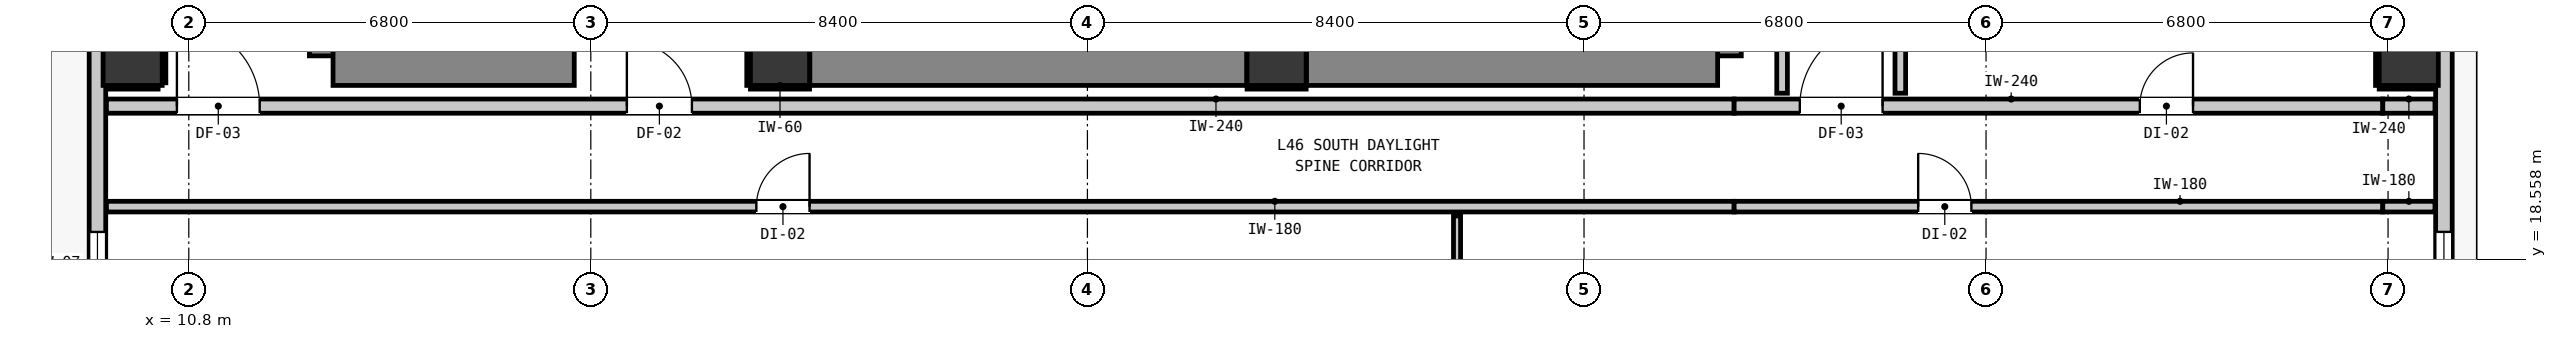
"""IFC4 building model, lengths in metres.
Left out: names, types, materials, properties, quantities, classifications, styles, units other than length and angle.
Written with IfcOpenShell. Run it as: python <this file> out.ifc"""

import sys

from ifc_helpers import new_model, si_unit, direction, frame, frame_2d, origin, origin_2d, place, context, subcontext, project, spatial, rectangle, extrude, element, fill, save


model = new_model("IFC4")
c1 = context("Model", 3, precision=1e-05, world=origin(), true_north=direction((0.0, 1.0)))
c2 = subcontext(c1, "Body", "Model", "MODEL_VIEW")
j1 = project(units=[si_unit("LENGTHUNIT", "METRE"), si_unit("PLANEANGLEUNIT", "RADIAN")], contexts=[c1])
p1 = place(None, origin())
s1 = spatial("IfcSite", under=j1, at=p1, CompositionType="ELEMENT")
p2 = place(p1, origin())
s2 = spatial("IfcBuilding", under=s1, at=p2, CompositionType="ELEMENT")
p3 = place(p2, frame((0.0, 0.0, 159.2)))
s3 = spatial("IfcBuildingStorey", under=s2, at=p3, CompositionType="ELEMENT", Elevation=159.2)
for number, where, z_axis, x_axis in (
    (1, (20.8, 22.0, 0.0), (0.0, 0.0, 1.0), (1.0, 0.0, 0.0)),
    (2, (29.2, 22.0, 0.0), (0.0, 0.0, 1.0), (1.0, 0.0, 0.0)),
):
    element("IfcColumn", number, at=place(p3, frame(where, z_axis=z_axis, x_axis=x_axis)), inside=s3, PredefinedType="COLUMN", context=c2, shape_type="SweptSolid", body=[
        extrude(rectangle(XDim=1.0, YDim=1.0, at=origin_2d()), origin(), (0.0, 0.0, 1.0), 3.32),
    ])
p4 = place(p3, frame((13.34, 22.0, 0.0), z_axis=(0.0, 0.0, 1.0), x_axis=(0.0, 1.0, 0.0)))
e3 = element("IfcWall", 3, at=p4, inside=s3, PredefinedType="SHEAR", context=c2, shape_type="SweptSolid", body=[
    extrude(rectangle(XDim=8.195, YDim=1.0, at=frame_2d((4.098, 0.0))), origin(), (0.0, 0.0, 1.0), 3.32),
])
p5 = place(p3, frame((13.24, 22.0, 0.0), z_axis=(0.0, 0.0, 1.0), x_axis=(1.0, 0.0, 0.0)))
e4 = element("IfcWall", 4, at=p5, inside=s3, PredefinedType="SHEAR", context=c2, shape_type="SweptSolid", body=[
    extrude(rectangle(XDim=4.08, YDim=1.0, at=frame_2d((2.04, 0.0))), origin(), (0.0, 0.0, 1.0), 3.32),
])
p6 = place(p3, frame((36.56, 22.0, 0.0), z_axis=(0.0, 0.0, 1.0), x_axis=(0.0, 1.0, 0.0)))
e5 = element("IfcWall", 5, at=p6, inside=s3, PredefinedType="SHEAR", context=c2, shape_type="SweptSolid", body=[
    extrude(rectangle(XDim=8.195, YDim=1.0, at=frame_2d((4.098, 0.0))), origin(), (0.0, 0.0, 1.0), 3.32),
])
p7 = place(p3, frame((29.705, 22.0, 0.0), z_axis=(0.0, 0.0, 1.0), x_axis=(1.0, 0.0, 0.0)))
e6 = element("IfcWall", 6, at=p7, inside=s3, PredefinedType="SHEAR", context=c2, shape_type="SweptSolid", body=[
    extrude(rectangle(XDim=6.955, YDim=1.0, at=frame_2d((3.478, 0.0))), origin(), (0.0, 0.0, 1.0), 3.32),
])
p8 = place(p3, frame((21.305, 22.0, 0.0), z_axis=(0.0, 0.0, 1.0), x_axis=(1.0, 0.0, 0.0)))
e7 = element("IfcWall", 7, at=p8, inside=s3, PredefinedType="SHEAR", context=c2, shape_type="SweptSolid", body=[
    extrude(rectangle(XDim=7.39, YDim=1.0, at=frame_2d((3.695, 0.0))), origin(), (0.0, 0.0, 1.0), 3.32),
])
for number, where, z_axis, x_axis in (
    (8, (9.85, 22.0, 0.0), (0.0, 0.0, 1.0), (1.0, 0.0, 0.0)),
    (9, (48.35, 22.0, 0.0), (0.0, 0.0, 1.0), (1.0, 0.0, 0.0)),
):
    element("IfcColumn", number, at=place(p3, frame(where, z_axis=z_axis, x_axis=x_axis)), inside=s3, PredefinedType="COLUMN", context=c2, shape_type="SweptSolid", body=[
        extrude(rectangle(XDim=1.0, YDim=1.0, at=origin_2d()), origin(), (0.0, 0.0, 1.0), 3.32),
    ])
p9 = place(p3, frame((9.255, 17.555, 0.0), z_axis=(0.0, 0.0, 1.0), x_axis=(0.0, 1.0, 0.0)))
e10 = element("IfcWall", 10, at=p9, inside=s3, PredefinedType="STANDARD", context=c2, shape_type="SweptSolid", body=[
    extrude(rectangle(XDim=32.29, YDim=0.28, at=frame_2d((16.145, 0.0))), origin(), (0.0, 0.0, 1.0), 3.08),
])
p10 = place(p9, frame((5.467, 0.0, 0.0)))
e11 = element("IfcOpeningElement", 11, at=p10, cuts=e10, PredefinedType="OPENING", context=c2, shape_type="SweptSolid", body=[
    extrude(rectangle(XDim=1.0, YDim=2.15, at=frame_2d((0.5, 1.075))), frame((0.0, 0.15, 0.0), z_axis=(0.0, -1.0, 0.0), x_axis=(1.0, 0.0, 0.0)), (0.0, 0.0, 1.0), 0.3),
])
p11 = place(p9, frame((0.417, 0.0, 0.85)))
e12 = element("IfcOpeningElement", 12, at=p11, cuts=e10, PredefinedType="OPENING", context=c2, shape_type="SweptSolid", body=[
    extrude(rectangle(XDim=1.05, YDim=1.65, at=frame_2d((0.525, 0.825))), frame((0.0, 0.15, 0.0), z_axis=(0.0, -1.0, 0.0), x_axis=(1.0, 0.0, 0.0)), (0.0, 0.0, 1.0), 0.3),
])
p12 = place(p9, frame((30.753, 0.0, 0.85)))
e13 = element("IfcOpeningElement", 13, at=p12, cuts=e10, PredefinedType="OPENING", context=c2, shape_type="SweptSolid", body=[
    extrude(rectangle(XDim=1.05, YDim=1.65, at=frame_2d((0.525, 0.825))), frame((0.0, 0.15, 0.0), z_axis=(0.0, -1.0, 0.0), x_axis=(1.0, 0.0, 0.0)), (0.0, 0.0, 1.0), 0.3),
])
p13 = place(p3, frame((48.945, 49.845, 0.0), z_axis=(0.0, 0.0, 1.0), x_axis=(0.0, -1.0, 0.0)))
e14 = element("IfcWall", 14, at=p13, inside=s3, PredefinedType="STANDARD", context=c2, shape_type="SweptSolid", body=[
    extrude(rectangle(XDim=32.29, YDim=0.28, at=frame_2d((16.145, 0.0))), origin(), (0.0, 0.0, 1.0), 3.08),
])
p14 = place(p13, frame((2.659, 0.0, 0.0)))
e15 = element("IfcOpeningElement", 15, at=p14, cuts=e14, PredefinedType="OPENING", context=c2, shape_type="SweptSolid", body=[
    extrude(rectangle(XDim=1.0, YDim=2.15, at=frame_2d((0.5, 1.075))), frame((0.0, 0.15, 0.0), z_axis=(0.0, -1.0, 0.0), x_axis=(1.0, 0.0, 0.0)), (0.0, 0.0, 1.0), 0.3),
])
p15 = place(p13, frame((30.822, 0.0, 0.85)))
e16 = element("IfcOpeningElement", 16, at=p15, cuts=e14, PredefinedType="OPENING", context=c2, shape_type="SweptSolid", body=[
    extrude(rectangle(XDim=1.05, YDim=1.65, at=frame_2d((0.525, 0.825))), frame((0.0, 0.15, 0.0), z_axis=(0.0, -1.0, 0.0), x_axis=(1.0, 0.0, 0.0)), (0.0, 0.0, 1.0), 0.3),
])
p16 = place(p13, frame((4.027, 0.0, 0.85)))
e17 = element("IfcOpeningElement", 17, at=p16, cuts=e14, PredefinedType="OPENING", context=c2, shape_type="SweptSolid", body=[
    extrude(rectangle(XDim=0.9, YDim=1.5, at=frame_2d((0.45, 0.75))), frame((0.0, 0.15, 0.0), z_axis=(0.0, -1.0, 0.0), x_axis=(1.0, 0.0, 0.0)), (0.0, 0.0, 1.0), 0.3),
])
p17 = place(p13, frame((0.487, 0.0, 0.85)))
e18 = element("IfcOpeningElement", 18, at=p17, cuts=e14, PredefinedType="OPENING", context=c2, shape_type="SweptSolid", body=[
    extrude(rectangle(XDim=1.05, YDim=1.65, at=frame_2d((0.525, 0.825))), frame((0.0, 0.15, 0.0), z_axis=(0.0, -1.0, 0.0), x_axis=(1.0, 0.0, 0.0)), (0.0, 0.0, 1.0), 0.3),
])
p18 = place(p13, frame((21.995, 0.0, 0.85)))
e19 = element("IfcOpeningElement", 19, at=p18, cuts=e14, PredefinedType="OPENING", context=c2, shape_type="SweptSolid", body=[
    extrude(rectangle(XDim=3.0, YDim=2.1, at=frame_2d((1.5, 1.05))), frame((0.0, 0.15, 0.0), z_axis=(0.0, -1.0, 0.0), x_axis=(1.0, 0.0, 0.0)), (0.0, 0.0, 1.0), 0.3),
])
p19 = place(p3, frame((9.407, 21.15, 0.0), z_axis=(0.0, 0.0, 1.0), x_axis=(1.0, 0.0, 0.0)))
e20 = element("IfcWall", 20, at=p19, inside=s3, PredefinedType="PARTITIONING", context=c2, shape_type="SweptSolid", body=[
    extrude(rectangle(XDim=27.532, YDim=0.24, at=frame_2d((13.766, 0.0))), origin(), (0.0, 0.0, 1.0), 3.08),
])
p20 = place(p19, frame((8.803, 0.0, 0.0)))
e21 = element("IfcOpeningElement", 21, at=p20, cuts=e20, PredefinedType="OPENING", context=c2, shape_type="SweptSolid", body=[
    extrude(rectangle(XDim=1.1, YDim=2.15, at=frame_2d((0.55, 1.075))), frame((0.0, 0.13, 0.0), z_axis=(0.0, -1.0, 0.0), x_axis=(1.0, 0.0, 0.0)), (0.0, 0.0, 1.0), 0.26),
])
p21 = place(p19, frame((1.192, 0.0, 0.0)))
e22 = element("IfcOpeningElement", 22, at=p21, cuts=e20, PredefinedType="OPENING", context=c2, shape_type="SweptSolid", body=[
    extrude(rectangle(XDim=1.4, YDim=2.15, at=frame_2d((0.7, 1.075))), frame((0.0, 0.13, 0.0), z_axis=(0.0, -1.0, 0.0), x_axis=(1.0, 0.0, 0.0)), (0.0, 0.0, 1.0), 0.26),
])
p22 = place(p3, frame((36.939, 21.15, 0.0), z_axis=(0.0, 0.0, 1.0), x_axis=(1.0, 0.0, 0.0)))
e23 = element("IfcWall", 23, at=p22, inside=s3, PredefinedType="PARTITIONING", context=c2, shape_type="SweptSolid", body=[
    extrude(rectangle(XDim=10.972, YDim=0.24, at=frame_2d((5.486, 0.0))), origin(), (0.0, 0.0, 1.0), 2.565),
])
p23 = place(p22, frame((1.111, 0.0, 0.0)))
e24 = element("IfcOpeningElement", 24, at=p23, cuts=e23, PredefinedType="OPENING", context=c2, shape_type="SweptSolid", body=[
    extrude(rectangle(XDim=1.4, YDim=2.15, at=frame_2d((0.7, 1.075))), frame((0.0, 0.13, 0.0), z_axis=(0.0, -1.0, 0.0), x_axis=(1.0, 0.0, 0.0)), (0.0, 0.0, 1.0), 0.26),
])
p24 = place(p22, frame((6.862, 0.0, 0.0)))
e25 = element("IfcOpeningElement", 25, at=p24, cuts=e23, PredefinedType="OPENING", context=c2, shape_type="SweptSolid", body=[
    extrude(rectangle(XDim=0.9, YDim=2.1, at=frame_2d((0.45, 1.05))), frame((0.0, 0.13, 0.0), z_axis=(0.0, -1.0, 0.0), x_axis=(1.0, 0.0, 0.0)), (0.0, 0.0, 1.0), 0.26),
])
p25 = place(p3, frame((47.911, 21.15, 0.0), z_axis=(0.0, 0.0, 1.0), x_axis=(1.0, 0.0, 0.0)))
e26 = element("IfcWall", 26, at=p25, inside=s3, PredefinedType="PARTITIONING", context=c2, shape_type="SweptSolid", body=[
    extrude(rectangle(XDim=0.882, YDim=0.24, at=frame_2d((0.441, 0.0))), origin(), (0.0, 0.0, 1.0), 3.08),
])
p26 = place(p3, frame((9.407, 19.45, 0.0), z_axis=(0.0, 0.0, 1.0), x_axis=(1.0, 0.0, 0.0)))
e27 = element("IfcWall", 27, at=p26, inside=s3, PredefinedType="PARTITIONING", context=c2, shape_type="SweptSolid", body=[
    extrude(rectangle(XDim=27.532, YDim=0.18, at=frame_2d((13.766, 0.0))), origin(), (0.0, 0.0, 1.0), 3.08),
])
p27 = place(p26, frame((10.993, 0.0, 0.0)))
e28 = element("IfcOpeningElement", 28, at=p27, cuts=e27, PredefinedType="OPENING", context=c2, shape_type="SweptSolid", body=[
    extrude(rectangle(XDim=0.9, YDim=2.1, at=frame_2d((0.45, 1.05))), frame((0.0, 0.1, 0.0), z_axis=(0.0, -1.0, 0.0), x_axis=(1.0, 0.0, 0.0)), (0.0, 0.0, 1.0), 0.2),
])
p28 = place(p3, frame((36.939, 19.45, 0.0), z_axis=(0.0, 0.0, 1.0), x_axis=(1.0, 0.0, 0.0)))
e29 = element("IfcWall", 29, at=p28, inside=s3, PredefinedType="PARTITIONING", context=c2, shape_type="SweptSolid", body=[
    extrude(rectangle(XDim=10.972, YDim=0.18, at=frame_2d((5.486, 0.0))), origin(), (0.0, 0.0, 1.0), 2.565),
])
p29 = place(p28, frame((3.113, 0.0, 0.0)))
e30 = element("IfcOpeningElement", 30, at=p29, cuts=e29, PredefinedType="OPENING", context=c2, shape_type="SweptSolid", body=[
    extrude(rectangle(XDim=0.9, YDim=2.1, at=frame_2d((0.45, 1.05))), frame((0.0, 0.1, 0.0), z_axis=(0.0, -1.0, 0.0), x_axis=(1.0, 0.0, 0.0)), (0.0, 0.0, 1.0), 0.2),
])
p30 = place(p3, frame((47.911, 19.45, 0.0), z_axis=(0.0, 0.0, 1.0), x_axis=(1.0, 0.0, 0.0)))
e31 = element("IfcWall", 31, at=p30, inside=s3, PredefinedType="PARTITIONING", context=c2, shape_type="SweptSolid", body=[
    extrude(rectangle(XDim=0.882, YDim=0.18, at=frame_2d((0.441, 0.0))), origin(), (0.0, 0.0, 1.0), 3.08),
])
p31 = place(p3, frame((37.75, 21.368, 0.0), z_axis=(0.0, 0.0, 1.0), x_axis=(0.0, 1.0, 0.0)))
e32 = element("IfcWall", 32, at=p31, inside=s3, PredefinedType="PARTITIONING", context=c2, shape_type="SweptSolid", body=[
    extrude(rectangle(XDim=18.694, YDim=0.18, at=frame_2d((9.347, 0.0))), origin(), (0.0, 0.0, 1.0), 3.08),
])
p32 = place(p3, frame((39.75, 21.368, 0.0), z_axis=(0.0, 0.0, 1.0), x_axis=(0.0, 1.0, 0.0)))
e33 = element("IfcWall", 33, at=p32, inside=s3, PredefinedType="PARTITIONING", context=c2, shape_type="SweptSolid", body=[
    extrude(rectangle(XDim=12.464, YDim=0.18, at=frame_2d((6.232, 0.0))), origin(), (0.0, 0.0, 1.0), 3.08),
])
p33 = place(p3, frame((32.252, 15.407, 0.0), z_axis=(0.0, 0.0, 1.0), x_axis=(0.0, 1.0, 0.0)))
e34 = element("IfcWall", 34, at=p33, inside=s3, PredefinedType="PARTITIONING", context=c2, shape_type="SweptSolid", body=[
    extrude(rectangle(XDim=3.885, YDim=0.12, at=frame_2d((1.942, 0.0))), origin(), (0.0, 0.0, 1.0), 3.08),
])
for number, where, z_axis, x_axis in (
    (35, (20.3, 21.468, 0.0), (0.0, 0.0, 1.0), (1.0, 0.0, 0.0)),
    (36, (20.268, 21.5, 0.0), (0.0, 0.0, 1.0), (0.0, 1.0, 0.0)),
    (37, (28.7, 21.468, 0.0), (0.0, 0.0, 1.0), (1.0, 0.0, 0.0)),
):
    element("IfcWall", number, at=place(p3, frame(where, z_axis=z_axis, x_axis=x_axis)), inside=s3, PredefinedType="PARTITIONING", context=c2, shape_type="SweptSolid", body=[
        extrude(rectangle(XDim=1.0, YDim=0.06, at=frame_2d((0.5, 0.0))), origin(), (0.0, 0.0, 1.0), 1.45),
    ])
p34 = place(p3, frame((9.41, 21.468, 0.0), z_axis=(0.0, 0.0, 1.0), x_axis=(1.0, 0.0, 0.0)))
e38 = element("IfcWall", 38, at=p34, inside=s3, PredefinedType="PARTITIONING", context=c2, shape_type="SweptSolid", body=[
    extrude(rectangle(XDim=0.871, YDim=0.06, at=frame_2d((0.436, 0.0))), origin(), (0.0, 0.0, 1.0), 1.45),
])
p35 = place(p3, frame((10.382, 21.544, 0.0), z_axis=(0.0, 0.0, 1.0), x_axis=(0.0, 1.0, 0.0)))
e39 = element("IfcWall", 39, at=p35, inside=s3, PredefinedType="PARTITIONING", context=c2, shape_type="SweptSolid", body=[
    extrude(rectangle(XDim=0.956, YDim=0.06, at=frame_2d((0.478, 0.0))), origin(), (0.0, 0.0, 1.0), 1.45),
])
p36 = place(p3, frame((47.85, 21.468, 0.0), z_axis=(0.0, 0.0, 1.0), x_axis=(1.0, 0.0, 0.0)))
e40 = element("IfcWall", 40, at=p36, inside=s3, PredefinedType="PARTITIONING", context=c2, shape_type="SweptSolid", body=[
    extrude(rectangle(XDim=0.94, YDim=0.06, at=frame_2d((0.47, 0.0))), origin(), (0.0, 0.0, 1.0), 1.45),
])
p37 = place(p3, frame((47.818, 21.5, 0.0), z_axis=(0.0, 0.0, 1.0), x_axis=(0.0, 1.0, 0.0)))
e41 = element("IfcWall", 41, at=p37, inside=s3, PredefinedType="PARTITIONING", context=c2, shape_type="SweptSolid", body=[
    extrude(rectangle(XDim=1.0, YDim=0.06, at=frame_2d((0.5, 0.0))), origin(), (0.0, 0.0, 1.0), 1.45),
])
p38 = place(p11, origin())
e42 = element("IfcWindow", 42, at=p38, inside=s3, PartitioningType="SINGLE_PANEL", PredefinedType="WINDOW", context=c2, shape_type="SweptSolid", body=[
    extrude(rectangle(XDim=1.05, YDim=1.65, at=frame_2d((0.525, 0.825))), frame((0.0, 0.03, 0.0), z_axis=(0.0, -1.0, 0.0), x_axis=(1.0, 0.0, 0.0)), (0.0, 0.0, 1.0), 0.06),
])
fill(e12, e42)
p39 = place(p15, origin())
e43 = element("IfcWindow", 43, at=p39, inside=s3, PartitioningType="SINGLE_PANEL", PredefinedType="WINDOW", context=c2, shape_type="SweptSolid", body=[
    extrude(rectangle(XDim=1.05, YDim=1.65, at=frame_2d((0.525, 0.825))), frame((0.0, 0.03, 0.0), z_axis=(0.0, -1.0, 0.0), x_axis=(1.0, 0.0, 0.0)), (0.0, 0.0, 1.0), 0.06),
])
fill(e16, e43)
p40 = place(p20, origin())
e44 = element("IfcDoor", 44, at=p40, inside=s3, OperationType="SINGLE_SWING_LEFT", PredefinedType="DOOR", context=c2, shape_type="SweptSolid", body=[
    extrude(rectangle(XDim=1.1, YDim=2.15, at=frame_2d((0.55, 1.075))), frame((0.0, 0.025, 0.0), z_axis=(0.0, -1.0, 0.0), x_axis=(1.0, 0.0, 0.0)), (0.0, 0.0, 1.0), 0.05),
])
fill(e21, e44)
p41 = place(p21, origin())
e45 = element("IfcDoor", 45, at=p41, inside=s3, OperationType="SINGLE_SWING_LEFT", PredefinedType="DOOR", context=c2, shape_type="SweptSolid", body=[
    extrude(rectangle(XDim=1.4, YDim=2.15, at=frame_2d((0.7, 1.075))), frame((0.0, 0.025, 0.0), z_axis=(0.0, -1.0, 0.0), x_axis=(1.0, 0.0, 0.0)), (0.0, 0.0, 1.0), 0.05),
])
fill(e22, e45)
p42 = place(p23, origin())
e46 = element("IfcDoor", 46, at=p42, inside=s3, OperationType="SINGLE_SWING_RIGHT", PredefinedType="DOOR", context=c2, shape_type="SweptSolid", body=[
    extrude(rectangle(XDim=1.4, YDim=2.15, at=frame_2d((0.7, 1.075))), frame((0.0, 0.025, 0.0), z_axis=(0.0, -1.0, 0.0), x_axis=(1.0, 0.0, 0.0)), (0.0, 0.0, 1.0), 0.05),
])
fill(e24, e46)
p43 = place(p27, origin())
e47 = element("IfcDoor", 47, at=p43, inside=s3, OperationType="SINGLE_SWING_RIGHT", PredefinedType="DOOR", context=c2, shape_type="SweptSolid", body=[
    extrude(rectangle(XDim=0.9, YDim=2.1, at=frame_2d((0.45, 1.05))), frame((0.0, 0.025, 0.0), z_axis=(0.0, -1.0, 0.0), x_axis=(1.0, 0.0, 0.0)), (0.0, 0.0, 1.0), 0.05),
])
fill(e28, e47)
p44 = place(p29, origin())
e48 = element("IfcDoor", 48, at=p44, inside=s3, OperationType="SINGLE_SWING_LEFT", PredefinedType="DOOR", context=c2, shape_type="SweptSolid", body=[
    extrude(rectangle(XDim=0.9, YDim=2.1, at=frame_2d((0.45, 1.05))), frame((0.0, 0.025, 0.0), z_axis=(0.0, -1.0, 0.0), x_axis=(1.0, 0.0, 0.0)), (0.0, 0.0, 1.0), 0.05),
])
fill(e30, e48)
p45 = place(p24, origin())
e49 = element("IfcDoor", 49, at=p45, inside=s3, OperationType="SINGLE_SWING_RIGHT", PredefinedType="DOOR", context=c2, shape_type="SweptSolid", body=[
    extrude(rectangle(XDim=0.9, YDim=2.1, at=frame_2d((0.45, 1.05))), frame((0.0, 0.025, 0.0), z_axis=(0.0, -1.0, 0.0), x_axis=(1.0, 0.0, 0.0)), (0.0, 0.0, 1.0), 0.05),
])
fill(e25, e49)
save(model, sys.argv[1])
